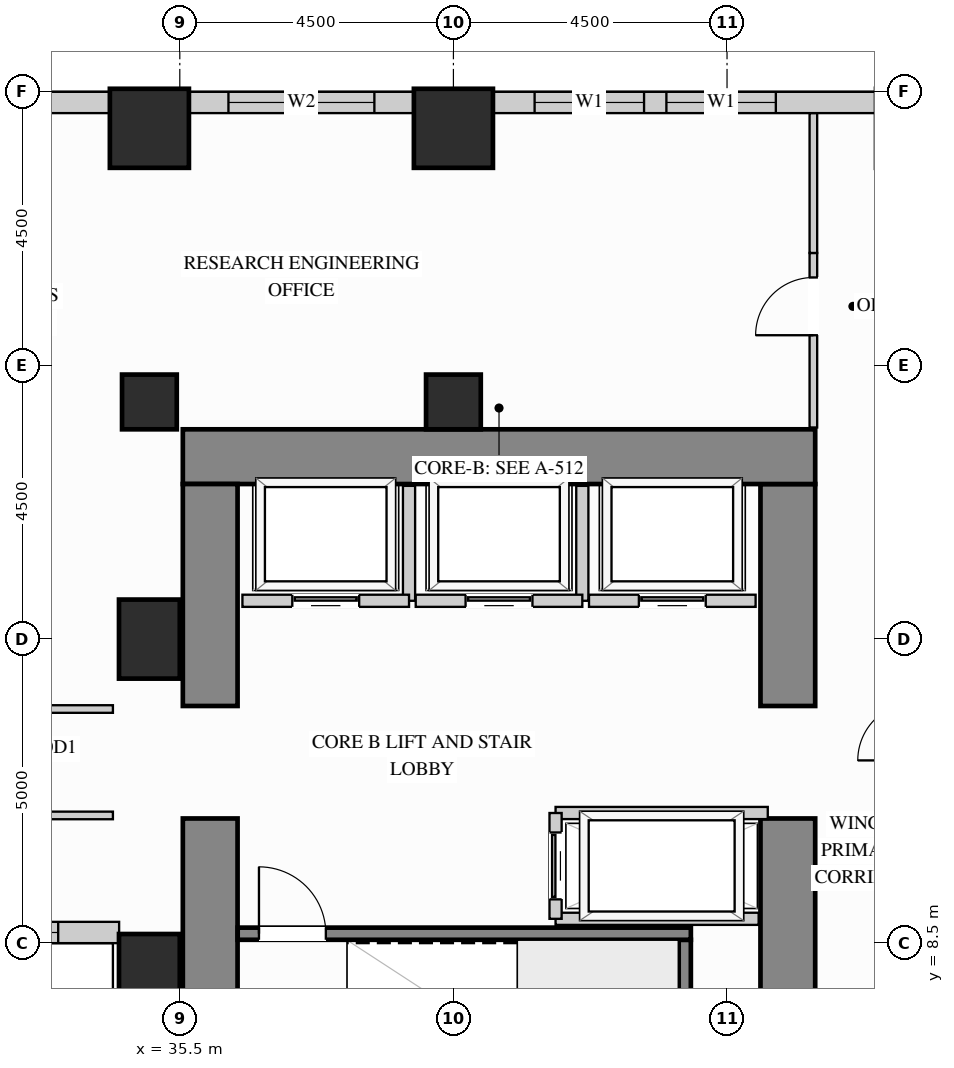
"""IFC4 building model, lengths in metres.
Left out: names, types, materials, properties, quantities, classifications, styles, units other than length and angle.
Written with IfcOpenShell. Run it as: python <this file> out.ifc"""

import sys

from ifc_helpers import new_model, si_unit, direction, frame, frame_2d, origin, origin_2d, place, context, subcontext, project, spatial, rectangle, extrude, source, transform, mapped, element, fill, save


model = new_model("IFC4")
c1 = context("Model", 3, precision=1e-05, world=origin(), true_north=direction((0.0, 1.0)))
c2 = subcontext(c1, "Body", "Model", "MODEL_VIEW")
j1 = project(units=[si_unit("LENGTHUNIT", "METRE"), si_unit("PLANEANGLEUNIT", "RADIAN")], contexts=[c1])
p1 = place(None, origin())
s1 = spatial("IfcSite", under=j1, at=p1, CompositionType="ELEMENT")
p2 = place(p1, origin())
s2 = spatial("IfcBuilding", under=s1, at=p2, CompositionType="ELEMENT")
p3 = place(p2, frame((0.0, 0.0, 36.9)))
s3 = spatial("IfcBuildingStorey", under=s2, at=p3, CompositionType="ELEMENT", Elevation=36.9)
m1 = source(origin(), c2, "Body", "SweptSolid", [
    extrude(rectangle(XDim=0.9, YDim=0.9, at=origin_2d()), origin(), (0.0, 0.0, 1.0), 3.38),
])
for number, where, z_axis, x_axis in (
    (1, (35.0, 17.4, 0.0), (0.0, 0.0, 1.0), (1.0, 0.0, 0.0)),
    (2, (40.0, 17.4, 0.0), (0.0, 0.0, 1.0), (1.0, 0.0, 0.0)),
):
    element("IfcColumn", number, at=place(p3, frame(where, z_axis=z_axis, x_axis=x_axis)), inside=s3, PredefinedType="COLUMN", context=c2, shape_type="MappedRepresentation", body=[
        mapped(m1, transform((0.0, 0.0, 0.0), x_axis=(1.0, 0.0, 0.0), y_axis=(0.0, 1.0, 0.0), z_axis=(0.0, 0.0, 1.0))),
    ])
m2 = source(origin(), c2, "Body", "SweptSolid", [
    extrude(rectangle(XDim=1.0, YDim=1.3, at=origin_2d()), origin(), (0.0, 0.0, 1.0), 3.38),
])
for number, where, z_axis, x_axis in (
    (3, (35.0, 13.5, 0.0), (0.0, 0.0, 1.0), (1.0, 0.0, 0.0)),
    (4, (35.0, 8.0, 0.0), (0.0, 0.0, 1.0), (1.0, 0.0, 0.0)),
):
    element("IfcColumn", number, at=place(p3, frame(where, z_axis=z_axis, x_axis=x_axis)), inside=s3, PredefinedType="COLUMN", context=c2, shape_type="MappedRepresentation", body=[
        mapped(m2, transform((0.0, 0.0, 0.0), x_axis=(1.0, 0.0, 0.0), y_axis=(0.0, 1.0, 0.0), z_axis=(0.0, 0.0, 1.0))),
    ])
m3 = source(origin(), c2, "Body", "SweptSolid", [
    extrude(rectangle(XDim=1.3, YDim=1.3, at=origin_2d()), origin(), (0.0, 0.0, 1.0), 3.38),
])
for number, where, z_axis, x_axis in (
    (5, (35.0, 21.9, 0.0), (0.0, 0.0, 1.0), (1.0, 0.0, 0.0)),
    (6, (40.0, 21.9, 0.0), (0.0, 0.0, 1.0), (1.0, 0.0, 0.0)),
):
    element("IfcColumn", number, at=place(p3, frame(where, z_axis=z_axis, x_axis=x_axis)), inside=s3, PredefinedType="COLUMN", context=c2, shape_type="MappedRepresentation", body=[
        mapped(m3, transform((0.0, 0.0, 0.0), x_axis=(1.0, 0.0, 0.0), y_axis=(0.0, 1.0, 0.0), z_axis=(0.0, 0.0, 1.0))),
    ])
m4 = source(origin(), c2, "Body", "SweptSolid", [
    extrude(rectangle(XDim=5.6, YDim=0.9, at=frame_2d((2.8, 0.0))), origin(), (0.0, 0.0, 1.0), 3.38),
])
p4 = place(p3, frame((45.5, 4.95, 0.0), z_axis=(0.0, 0.0, 1.0), x_axis=(0.0, 1.0, 0.0)))
e7 = element("IfcWall", 7, at=p4, inside=s3, PredefinedType="SHEAR", context=c2, shape_type="MappedRepresentation", body=[
    mapped(m4, transform((0.0, 0.0, 0.0), x_axis=(1.0, 0.0, 0.0), y_axis=(0.0, 1.0, 0.0), z_axis=(0.0, 0.0, 1.0))),
])
m5 = source(origin(), c2, "Body", "SweptSolid", [
    extrude(rectangle(XDim=3.65, YDim=0.9, at=frame_2d((1.825, 0.0))), origin(), (0.0, 0.0, 1.0), 3.38),
])
p5 = place(p3, frame((45.5, 12.4, 0.0), z_axis=(0.0, 0.0, 1.0), x_axis=(0.0, 1.0, 0.0)))
e8 = element("IfcWall", 8, at=p5, inside=s3, PredefinedType="SHEAR", context=c2, shape_type="MappedRepresentation", body=[
    mapped(m5, transform((0.0, 0.0, 0.0), x_axis=(1.0, 0.0, 0.0), y_axis=(0.0, 1.0, 0.0), z_axis=(0.0, 0.0, 1.0))),
])
m6 = source(origin(), c2, "Body", "SweptSolid", [
    extrude(rectangle(XDim=10.4, YDim=0.9, at=frame_2d((5.2, 0.0))), origin(), (0.0, 0.0, 1.0), 3.38),
])
p6 = place(p3, frame((35.55, 16.5, 0.0), z_axis=(0.0, 0.0, 1.0), x_axis=(1.0, 0.0, 0.0)))
e9 = element("IfcWall", 9, at=p6, inside=s3, PredefinedType="SHEAR", context=c2, shape_type="MappedRepresentation", body=[
    mapped(m6, transform((0.0, 0.0, 0.0), x_axis=(1.0, 0.0, 0.0), y_axis=(0.0, 1.0, 0.0), z_axis=(0.0, 0.0, 1.0))),
])
p7 = place(p3, frame((36.0, 4.95, 0.0), z_axis=(0.0, 0.0, 1.0), x_axis=(0.0, 1.0, 0.0)))
e10 = element("IfcWall", 10, at=p7, inside=s3, PredefinedType="SHEAR", context=c2, shape_type="MappedRepresentation", body=[
    mapped(m4, transform((0.0, 0.0, 0.0), x_axis=(1.0, 0.0, 0.0), y_axis=(0.0, 1.0, 0.0), z_axis=(0.0, 0.0, 1.0))),
])
p8 = place(p3, frame((36.0, 12.4, 0.0), z_axis=(0.0, 0.0, 1.0), x_axis=(0.0, 1.0, 0.0)))
e11 = element("IfcWall", 11, at=p8, inside=s3, PredefinedType="SHEAR", context=c2, shape_type="MappedRepresentation", body=[
    mapped(m5, transform((0.0, 0.0, 0.0), x_axis=(1.0, 0.0, 0.0), y_axis=(0.0, 1.0, 0.0), z_axis=(0.0, 0.0, 1.0))),
])
p9 = place(p3, frame((30.998, 8.675, 0.0), z_axis=(0.0, 0.0, 1.0), x_axis=(1.0, 0.0, 0.0)))
e12 = element("IfcWall", 12, at=p9, inside=s3, PredefinedType="SOLIDWALL", context=c2, shape_type="SweptSolid", body=[
    extrude(rectangle(XDim=3.504, YDim=0.35, at=frame_2d((1.752, 0.0))), origin(), (0.0, 0.0, 1.0), 3.365),
])
p10 = place(p9, frame((1.002, 0.0, 0.78)))
e13 = element("IfcOpeningElement", 13, at=p10, cuts=e12, PredefinedType="OPENING", context=c2, shape_type="SweptSolid", body=[
    extrude(rectangle(XDim=1.5, YDim=2.0, at=frame_2d((0.75, 1.0))), frame((0.0, 0.185, 0.0), z_axis=(0.0, -1.0, 0.0), x_axis=(1.0, 0.0, 0.0)), (0.0, 0.0, 1.0), 0.37),
])
p11 = place(p3, frame((46.952, 22.325, 0.0), z_axis=(0.0, 0.0, 1.0), x_axis=(-1.0, 0.0, 0.0)))
e14 = element("IfcWall", 14, at=p11, inside=s3, PredefinedType="SOLIDWALL", context=c2, shape_type="SweptSolid", body=[
    extrude(rectangle(XDim=6.304, YDim=0.35, at=frame_2d((3.152, 0.0))), origin(), (0.0, 0.0, 1.0), 2.51),
])
p12 = place(p11, frame((1.649, 0.0, 0.78)))
e15 = element("IfcOpeningElement", 15, at=p12, cuts=e14, PredefinedType="OPENING", context=c2, shape_type="SweptSolid", body=[
    extrude(rectangle(XDim=1.8, YDim=1.55, at=frame_2d((0.9, 0.775))), frame((0.0, 0.185, 0.0), z_axis=(0.0, -1.0, 0.0), x_axis=(1.0, 0.0, 0.0)), (0.0, 0.0, 1.0), 0.37),
])
p13 = place(p11, frame((3.817, 0.0, 0.78)))
e16 = element("IfcOpeningElement", 16, at=p13, cuts=e14, PredefinedType="OPENING", context=c2, shape_type="SweptSolid", body=[
    extrude(rectangle(XDim=1.8, YDim=1.55, at=frame_2d((0.9, 0.775))), frame((0.0, 0.185, 0.0), z_axis=(0.0, -1.0, 0.0), x_axis=(1.0, 0.0, 0.0)), (0.0, 0.0, 1.0), 0.37),
])
p14 = place(p3, frame((39.352, 22.325, 0.0), z_axis=(0.0, 0.0, 1.0), x_axis=(-1.0, 0.0, 0.0)))
e17 = element("IfcWall", 17, at=p14, inside=s3, PredefinedType="SOLIDWALL", context=c2, shape_type="SweptSolid", body=[
    extrude(rectangle(XDim=3.704, YDim=0.35, at=frame_2d((1.852, 0.0))), origin(), (0.0, 0.0, 1.0), 2.51),
])
p15 = place(p14, frame((0.652, 0.0, 0.78)))
e18 = element("IfcOpeningElement", 18, at=p15, cuts=e17, PredefinedType="OPENING", context=c2, shape_type="SweptSolid", body=[
    extrude(rectangle(XDim=2.4, YDim=1.55, at=frame_2d((1.2, 0.775))), frame((0.0, 0.185, 0.0), z_axis=(0.0, -1.0, 0.0), x_axis=(1.0, 0.0, 0.0)), (0.0, 0.0, 1.0), 0.37),
])
p16 = place(p3, frame((34.352, 22.325, 0.0), z_axis=(0.0, 0.0, 1.0), x_axis=(-1.0, 0.0, 0.0)))
e19 = element("IfcWall", 19, at=p16, inside=s3, PredefinedType="SOLIDWALL", context=c2, shape_type="SweptSolid", body=[
    extrude(rectangle(XDim=14.854, YDim=0.35, at=frame_2d((7.427, 0.0))), origin(), (0.0, 0.0, 1.0), 3.365),
])
p17 = place(p16, frame((4.058, 0.0, 0.78)))
e20 = element("IfcOpeningElement", 20, at=p17, cuts=e19, PredefinedType="OPENING", context=c2, shape_type="SweptSolid", body=[
    extrude(rectangle(XDim=1.5, YDim=2.0, at=frame_2d((0.75, 1.0))), frame((0.0, 0.185, 0.0), z_axis=(0.0, -1.0, 0.0), x_axis=(1.0, 0.0, 0.0)), (0.0, 0.0, 1.0), 0.37),
])
p18 = place(p16, frame((9.296, 0.0, 0.78)))
e21 = element("IfcOpeningElement", 21, at=p18, cuts=e19, PredefinedType="OPENING", context=c2, shape_type="SweptSolid", body=[
    extrude(rectangle(XDim=1.5, YDim=2.0, at=frame_2d((0.75, 1.0))), frame((0.0, 0.185, 0.0), z_axis=(0.0, -1.0, 0.0), x_axis=(1.0, 0.0, 0.0)), (0.0, 0.0, 1.0), 0.37),
])
p19 = place(p3, frame((45.92, 16.98, 0.0), z_axis=(0.0, 0.0, 1.0), x_axis=(0.0, 1.0, 0.0)))
e22 = element("IfcWall", 22, at=p19, inside=s3, PredefinedType="PARTITIONING", context=c2, shape_type="SweptSolid", body=[
    extrude(rectangle(XDim=2.87, YDim=0.125, at=frame_2d((1.435, 0.0))), origin(), (0.0, 0.0, 1.0), 3.365),
])
p20 = place(p19, frame((1.517, 0.0, 0.0)))
e23 = element("IfcOpeningElement", 23, at=p20, cuts=e22, PredefinedType="OPENING", context=c2, shape_type="SweptSolid", body=[
    extrude(rectangle(XDim=0.95, YDim=2.15, at=frame_2d((0.475, 1.075))), frame((0.0, 0.073, 0.0), z_axis=(0.0, -1.0, 0.0), x_axis=(1.0, 0.0, 0.0)), (0.0, 0.0, 1.0), 0.145),
])
m7 = source(origin(), c2, "Body", "SweptSolid", [
    extrude(rectangle(XDim=2.298, YDim=0.125, at=frame_2d((1.149, 0.0))), origin(), (0.0, 0.0, 1.0), 3.365),
])
p21 = place(p3, frame((45.92, 19.85, 0.0), z_axis=(0.0, 0.0, 1.0), x_axis=(0.0, 1.0, 0.0)))
e24 = element("IfcWall", 24, at=p21, inside=s3, PredefinedType="PARTITIONING", context=c2, shape_type="MappedRepresentation", body=[
    mapped(m7, transform((0.0, 0.0, 0.0), x_axis=(1.0, 0.0, 0.0), y_axis=(0.0, 1.0, 0.0), z_axis=(0.0, 0.0, 1.0))),
])
p22 = place(p3, frame((29.85, 12.35, 0.0), z_axis=(0.0, 0.0, 1.0), x_axis=(1.0, 0.0, 0.0)))
e25 = element("IfcWall", 25, at=p22, inside=s3, PredefinedType="PARTITIONING", context=c2, shape_type="SweptSolid", body=[
    extrude(rectangle(XDim=4.55, YDim=0.125, at=frame_2d((2.275, 0.0))), origin(), (0.0, 0.0, 1.0), 3.365),
])
p23 = place(p22, frame((1.8, 0.0, 0.0)))
e26 = element("IfcOpeningElement", 26, at=p23, cuts=e25, PredefinedType="OPENING", context=c2, shape_type="SweptSolid", body=[
    extrude(rectangle(XDim=0.95, YDim=2.15, at=frame_2d((0.475, 1.075))), frame((0.0, 0.073, 0.0), z_axis=(0.0, -1.0, 0.0), x_axis=(1.0, 0.0, 0.0)), (0.0, 0.0, 1.0), 0.145),
])
p24 = place(p3, frame((29.85, 10.6, 0.0), z_axis=(0.0, 0.0, 1.0), x_axis=(1.0, 0.0, 0.0)))
e27 = element("IfcWall", 27, at=p24, inside=s3, PredefinedType="PARTITIONING", context=c2, shape_type="SweptSolid", body=[
    extrude(rectangle(XDim=4.55, YDim=0.125, at=frame_2d((2.275, 0.0))), origin(), (0.0, 0.0, 1.0), 3.365),
])
p25 = place(p24, frame((1.8, 0.0, 0.0)))
e28 = element("IfcOpeningElement", 28, at=p25, cuts=e27, PredefinedType="OPENING", context=c2, shape_type="SweptSolid", body=[
    extrude(rectangle(XDim=0.95, YDim=2.15, at=frame_2d((0.475, 1.075))), frame((0.0, 0.073, 0.0), z_axis=(0.0, -1.0, 0.0), x_axis=(1.0, 0.0, 0.0)), (0.0, 0.0, 1.0), 0.145),
])
m8 = source(origin(), c2, "Body", "SweptSolid", [
    extrude(rectangle(XDim=1.89, YDim=0.2, at=frame_2d((0.945, 0.0))), origin(), (0.0, 0.0, 1.0), 3.365),
])
p26 = place(p3, frame((39.27, 14.13, 0.0), z_axis=(0.0, 0.0, 1.0), x_axis=(0.0, 1.0, 0.0)))
e29 = element("IfcWall", 29, at=p26, inside=s3, PredefinedType="PARTITIONING", context=c2, shape_type="MappedRepresentation", body=[
    mapped(m8, transform((0.0, 0.0, 0.0), x_axis=(1.0, 0.0, 0.0), y_axis=(0.0, 1.0, 0.0), z_axis=(0.0, 0.0, 1.0))),
])
p27 = place(p3, frame((36.53, 14.13, 0.0), z_axis=(0.0, 0.0, 1.0), x_axis=(1.0, 0.0, 0.0)))
e30 = element("IfcWall", 30, at=p27, inside=s3, PredefinedType="PARTITIONING", context=c2, shape_type="SweptSolid", body=[
    extrude(rectangle(XDim=2.74, YDim=0.2, at=frame_2d((1.37, 0.0))), origin(), (0.0, 0.0, 1.0), 3.365),
])
p28 = place(p27, frame((0.82, 0.0, 0.0)))
e31 = element("IfcOpeningElement", 31, at=p28, cuts=e30, PredefinedType="OPENING", context=c2, shape_type="SweptSolid", body=[
    extrude(rectangle(XDim=1.1, YDim=2.2, at=frame_2d((0.55, 1.1))), frame((0.0, 0.11, 0.0), z_axis=(0.0, -1.0, 0.0), x_axis=(1.0, 0.0, 0.0)), (0.0, 0.0, 1.0), 0.22),
])
p29 = place(p3, frame((42.12, 14.13, 0.0), z_axis=(0.0, 0.0, 1.0), x_axis=(0.0, 1.0, 0.0)))
e32 = element("IfcWall", 32, at=p29, inside=s3, PredefinedType="PARTITIONING", context=c2, shape_type="MappedRepresentation", body=[
    mapped(m8, transform((0.0, 0.0, 0.0), x_axis=(1.0, 0.0, 0.0), y_axis=(0.0, 1.0, 0.0), z_axis=(0.0, 0.0, 1.0))),
])
p30 = place(p3, frame((39.38, 14.13, 0.0), z_axis=(0.0, 0.0, 1.0), x_axis=(1.0, 0.0, 0.0)))
e33 = element("IfcWall", 33, at=p30, inside=s3, PredefinedType="PARTITIONING", context=c2, shape_type="SweptSolid", body=[
    extrude(rectangle(XDim=2.74, YDim=0.2, at=frame_2d((1.37, 0.0))), origin(), (0.0, 0.0, 1.0), 3.365),
])
p31 = place(p30, frame((0.82, 0.0, 0.0)))
e34 = element("IfcOpeningElement", 34, at=p31, cuts=e33, PredefinedType="OPENING", context=c2, shape_type="SweptSolid", body=[
    extrude(rectangle(XDim=1.1, YDim=2.2, at=frame_2d((0.55, 1.1))), frame((0.0, 0.11, 0.0), z_axis=(0.0, -1.0, 0.0), x_axis=(1.0, 0.0, 0.0)), (0.0, 0.0, 1.0), 0.22),
])
p32 = place(p3, frame((42.23, 14.13, 0.0), z_axis=(0.0, 0.0, 1.0), x_axis=(1.0, 0.0, 0.0)))
e35 = element("IfcWall", 35, at=p32, inside=s3, PredefinedType="PARTITIONING", context=c2, shape_type="SweptSolid", body=[
    extrude(rectangle(XDim=2.74, YDim=0.2, at=frame_2d((1.37, 0.0))), origin(), (0.0, 0.0, 1.0), 3.365),
])
p33 = place(p32, frame((0.82, 0.0, 0.0)))
e36 = element("IfcOpeningElement", 36, at=p33, cuts=e35, PredefinedType="OPENING", context=c2, shape_type="SweptSolid", body=[
    extrude(rectangle(XDim=1.1, YDim=2.2, at=frame_2d((0.55, 1.1))), frame((0.0, 0.11, 0.0), z_axis=(0.0, -1.0, 0.0), x_axis=(1.0, 0.0, 0.0)), (0.0, 0.0, 1.0), 0.22),
])
m9 = source(origin(), c2, "Body", "SweptSolid", [
    extrude(rectangle(XDim=3.49, YDim=0.2, at=frame_2d((1.745, 0.0))), origin(), (0.0, 0.0, 1.0), 3.365),
])
p34 = place(p3, frame((41.68, 10.64, 0.0), z_axis=(0.0, 0.0, 1.0), x_axis=(1.0, 0.0, 0.0)))
e37 = element("IfcWall", 37, at=p34, inside=s3, PredefinedType="PARTITIONING", context=c2, shape_type="MappedRepresentation", body=[
    mapped(m9, transform((0.0, 0.0, 0.0), x_axis=(1.0, 0.0, 0.0), y_axis=(0.0, 1.0, 0.0), z_axis=(0.0, 0.0, 1.0))),
])
m10 = source(origin(), c2, "Body", "SweptSolid", [
    extrude(rectangle(XDim=3.34, YDim=0.2, at=frame_2d((1.67, 0.0))), origin(), (0.0, 0.0, 1.0), 3.365),
])
p35 = place(p3, frame((41.68, 8.9, 0.0), z_axis=(0.0, 0.0, 1.0), x_axis=(1.0, 0.0, 0.0)))
e38 = element("IfcWall", 38, at=p35, inside=s3, PredefinedType="PARTITIONING", context=c2, shape_type="MappedRepresentation", body=[
    mapped(m10, transform((0.0, 0.0, 0.0), x_axis=(1.0, 0.0, 0.0), y_axis=(0.0, 1.0, 0.0), z_axis=(0.0, 0.0, 1.0))),
])
p36 = place(p3, frame((41.68, 8.9, 0.0), z_axis=(0.0, 0.0, 1.0), x_axis=(0.0, 1.0, 0.0)))
e39 = element("IfcWall", 39, at=p36, inside=s3, PredefinedType="PARTITIONING", context=c2, shape_type="SweptSolid", body=[
    extrude(rectangle(XDim=1.74, YDim=0.2, at=frame_2d((0.87, 0.0))), origin(), (0.0, 0.0, 1.0), 3.365),
])
p37 = place(p36, frame((0.32, 0.0, 0.0)))
e40 = element("IfcOpeningElement", 40, at=p37, cuts=e39, PredefinedType="OPENING", context=c2, shape_type="SweptSolid", body=[
    extrude(rectangle(XDim=1.1, YDim=2.2, at=frame_2d((0.55, 1.1))), frame((0.0, 0.11, 0.0), z_axis=(0.0, -1.0, 0.0), x_axis=(1.0, 0.0, 0.0)), (0.0, 0.0, 1.0), 0.22),
])
m11 = source(origin(), c2, "Body", "SweptSolid", [
    extrude(rectangle(XDim=3.603, YDim=0.2, at=frame_2d((1.802, 0.0))), origin(), (0.0, 0.0, 1.0), 3.38),
])
p38 = place(p3, frame((43.805, 4.952, 0.0), z_axis=(0.0, 0.0, 1.0), x_axis=(0.0, 1.0, 0.0)))
e41 = element("IfcWall", 41, at=p38, inside=s3, PredefinedType="SHEAR", context=c2, shape_type="MappedRepresentation", body=[
    mapped(m11, transform((0.0, 0.0, 0.0), x_axis=(1.0, 0.0, 0.0), y_axis=(0.0, 1.0, 0.0), z_axis=(0.0, 0.0, 1.0))),
])
p39 = place(p3, frame((36.452, 8.655, 0.0), z_axis=(0.0, 0.0, 1.0), x_axis=(1.0, 0.0, 0.0)))
e42 = element("IfcWall", 42, at=p39, inside=s3, PredefinedType="SHEAR", context=c2, shape_type="SweptSolid", body=[
    extrude(rectangle(XDim=7.453, YDim=0.2, at=frame_2d((3.727, 0.0))), origin(), (0.0, 0.0, 1.0), 3.38),
])
p40 = place(p39, frame((0.35, 0.0, 0.0)))
e43 = element("IfcOpeningElement", 43, at=p40, cuts=e42, PredefinedType="OPENING", context=c2, shape_type="SweptSolid", body=[
    extrude(rectangle(XDim=1.1, YDim=2.15, at=frame_2d((0.55, 1.075))), frame((0.0, 0.11, 0.0), z_axis=(0.0, -1.0, 0.0), x_axis=(1.0, 0.0, 0.0)), (0.0, 0.0, 1.0), 0.22),
])
m12 = source(origin(), c2, "Body", "SweptSolid", [
    extrude(rectangle(XDim=1.1, YDim=2.2, at=frame_2d((0.55, 1.1))), frame((0.0, 0.025, 0.0), z_axis=(0.0, -1.0, 0.0), x_axis=(1.0, 0.0, 0.0)), (0.0, 0.0, 1.0), 0.05),
])
p41 = place(p28, origin())
e44 = element("IfcDoor", 44, at=p41, inside=s3, OperationType="SLIDING_TO_LEFT", PredefinedType="DOOR", context=c2, shape_type="MappedRepresentation", body=[
    mapped(m12, transform((0.0, 0.0, 0.0), x_axis=(1.0, 0.0, 0.0), y_axis=(0.0, 1.0, 0.0), z_axis=(0.0, 0.0, 1.0))),
])
fill(e31, e44)
p42 = place(p31, origin())
e45 = element("IfcDoor", 45, at=p42, inside=s3, OperationType="SLIDING_TO_LEFT", PredefinedType="DOOR", context=c2, shape_type="MappedRepresentation", body=[
    mapped(m12, transform((0.0, 0.0, 0.0), x_axis=(1.0, 0.0, 0.0), y_axis=(0.0, 1.0, 0.0), z_axis=(0.0, 0.0, 1.0))),
])
fill(e34, e45)
p43 = place(p33, origin())
e46 = element("IfcDoor", 46, at=p43, inside=s3, OperationType="SLIDING_TO_LEFT", PredefinedType="DOOR", context=c2, shape_type="MappedRepresentation", body=[
    mapped(m12, transform((0.0, 0.0, 0.0), x_axis=(1.0, 0.0, 0.0), y_axis=(0.0, 1.0, 0.0), z_axis=(0.0, 0.0, 1.0))),
])
fill(e36, e46)
p44 = place(p37, origin())
e47 = element("IfcDoor", 47, at=p44, inside=s3, OperationType="SLIDING_TO_LEFT", PredefinedType="DOOR", context=c2, shape_type="MappedRepresentation", body=[
    mapped(m12, transform((0.0, 0.0, 0.0), x_axis=(1.0, 0.0, 0.0), y_axis=(0.0, 1.0, 0.0), z_axis=(0.0, 0.0, 1.0))),
])
fill(e40, e47)
m13 = source(origin(), c2, "Body", "SweptSolid", [
    extrude(rectangle(XDim=0.95, YDim=2.15, at=frame_2d((0.475, 1.075))), frame((0.0, 0.025, 0.0), z_axis=(0.0, -1.0, 0.0), x_axis=(1.0, 0.0, 0.0)), (0.0, 0.0, 1.0), 0.05),
])
p45 = place(p20, origin())
e48 = element("IfcDoor", 48, at=p45, inside=s3, OperationType="SINGLE_SWING_LEFT", PredefinedType="DOOR", context=c2, shape_type="MappedRepresentation", body=[
    mapped(m13, transform((0.0, 0.0, 0.0), x_axis=(1.0, 0.0, 0.0), y_axis=(0.0, 1.0, 0.0), z_axis=(0.0, 0.0, 1.0))),
])
fill(e23, e48)
m14 = source(origin(), c2, "Body", "SweptSolid", [
    extrude(rectangle(XDim=1.1, YDim=2.15, at=frame_2d((0.55, 1.075))), frame((0.0, 0.025, 0.0), z_axis=(0.0, -1.0, 0.0), x_axis=(1.0, 0.0, 0.0)), (0.0, 0.0, 1.0), 0.05),
])
p46 = place(p40, origin())
e49 = element("IfcDoor", 49, at=p46, inside=s3, OperationType="SINGLE_SWING_LEFT", PredefinedType="DOOR", context=c2, shape_type="MappedRepresentation", body=[
    mapped(m14, transform((0.0, 0.0, 0.0), x_axis=(1.0, 0.0, 0.0), y_axis=(0.0, 1.0, 0.0), z_axis=(0.0, 0.0, 1.0))),
])
fill(e43, e49)
m15 = source(origin(), c2, "Body", "SweptSolid", [
    extrude(rectangle(XDim=1.8, YDim=1.55, at=frame_2d((0.9, 0.775))), frame((0.0, 0.03, 0.0), z_axis=(0.0, -1.0, 0.0), x_axis=(1.0, 0.0, 0.0)), (0.0, 0.0, 1.0), 0.06),
])
p47 = place(p12, origin())
e50 = element("IfcWindow", 50, at=p47, inside=s3, PartitioningType="SINGLE_PANEL", PredefinedType="WINDOW", context=c2, shape_type="MappedRepresentation", body=[
    mapped(m15, transform((0.0, 0.0, 0.0), x_axis=(1.0, 0.0, 0.0), y_axis=(0.0, 1.0, 0.0), z_axis=(0.0, 0.0, 1.0))),
])
fill(e15, e50)
p48 = place(p13, origin())
e51 = element("IfcWindow", 51, at=p48, inside=s3, PartitioningType="SINGLE_PANEL", PredefinedType="WINDOW", context=c2, shape_type="MappedRepresentation", body=[
    mapped(m15, transform((0.0, 0.0, 0.0), x_axis=(1.0, 0.0, 0.0), y_axis=(0.0, 1.0, 0.0), z_axis=(0.0, 0.0, 1.0))),
])
fill(e16, e51)
m16 = source(origin(), c2, "Body", "SweptSolid", [
    extrude(rectangle(XDim=2.4, YDim=1.55, at=frame_2d((1.2, 0.775))), frame((0.0, 0.03, 0.0), z_axis=(0.0, -1.0, 0.0), x_axis=(1.0, 0.0, 0.0)), (0.0, 0.0, 1.0), 0.06),
])
p49 = place(p15, origin())
e52 = element("IfcWindow", 52, at=p49, inside=s3, PartitioningType="SINGLE_PANEL", PredefinedType="WINDOW", context=c2, shape_type="MappedRepresentation", body=[
    mapped(m16, transform((0.0, 0.0, 0.0), x_axis=(1.0, 0.0, 0.0), y_axis=(0.0, 1.0, 0.0), z_axis=(0.0, 0.0, 1.0))),
])
fill(e18, e52)
m17 = source(origin(), c2, "Body", "SweptSolid", [
    extrude(rectangle(XDim=1.5, YDim=2.0, at=frame_2d((0.75, 1.0))), frame((0.0, 0.03, 0.0), z_axis=(0.0, -1.0, 0.0), x_axis=(1.0, 0.0, 0.0)), (0.0, 0.0, 1.0), 0.06),
])
p50 = place(p10, origin())
e53 = element("IfcWindow", 53, at=p50, inside=s3, PartitioningType="SINGLE_PANEL", PredefinedType="WINDOW", context=c2, shape_type="MappedRepresentation", body=[
    mapped(m17, transform((0.0, 0.0, 0.0), x_axis=(1.0, 0.0, 0.0), y_axis=(0.0, 1.0, 0.0), z_axis=(0.0, 0.0, 1.0))),
])
fill(e13, e53)
save(model, sys.argv[1])
